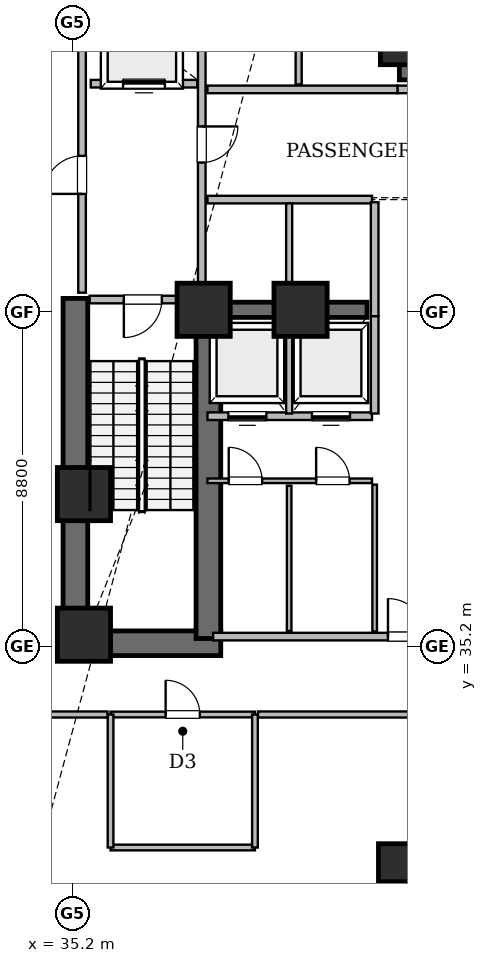
"""IFC4 building model, lengths in metres.
Left out: names, types, materials, properties, quantities, classifications, styles, units other than length and angle.
Written with IfcOpenShell. Run it as: python <this file> out.ifc"""

import sys

from ifc_helpers import new_model, si_unit, direction, frame, frame_2d, origin, origin_2d, place, context, subcontext, project, spatial, rectangle, extrude, element, fill, save


model = new_model("IFC4")
c1 = context("Model", 3, precision=1e-05, world=origin(), true_north=direction((0.0, 1.0)))
c2 = subcontext(c1, "Body", "Model", "MODEL_VIEW")
j1 = project(units=[si_unit("LENGTHUNIT", "METRE"), si_unit("PLANEANGLEUNIT", "RADIAN")], contexts=[c1])
p1 = place(None, origin())
s1 = spatial("IfcSite", under=j1, at=p1, CompositionType="ELEMENT")
p2 = place(p1, origin())
s2 = spatial("IfcBuilding", under=s1, at=p2, CompositionType="ELEMENT")
p3 = place(p2, frame((0.0, 0.0, 24.0)))
s3 = spatial("IfcBuildingStorey", under=s2, at=p3, CompositionType="ELEMENT", Elevation=24.0)
p4 = place(p3, frame((34.95, 35.275, 0.0), z_axis=(0.0, 0.0, 1.0), x_axis=(1.0, 0.0, 0.0)))
e1 = element("IfcWall", 1, at=p4, inside=s3, PredefinedType="SHEAR", context=c2, shape_type="SweptSolid", body=[
    extrude(rectangle(XDim=4.15, YDim=0.65, at=frame_2d((2.075, 0.0))), origin(), (0.0, 0.0, 1.0), 4.925),
])
p5 = place(p3, frame((35.275, 34.95, 0.0), z_axis=(0.0, 0.0, 1.0), x_axis=(0.0, 1.0, 0.0)))
e2 = element("IfcWall", 2, at=p5, inside=s3, PredefinedType="SHEAR", context=c2, shape_type="SweptSolid", body=[
    extrude(rectangle(XDim=9.4, YDim=0.65, at=frame_2d((4.7, 0.0))), origin(), (0.0, 0.0, 1.0), 4.925),
])
p6 = place(p3, frame((38.775, 35.4, 0.0), z_axis=(0.0, 0.0, 1.0), x_axis=(0.0, 1.0, 0.0)))
e3 = element("IfcWall", 3, at=p6, inside=s3, PredefinedType="SHEAR", context=c2, shape_type="SweptSolid", body=[
    extrude(rectangle(XDim=8.95, YDim=0.65, at=frame_2d((4.475, 0.0))), origin(), (0.0, 0.0, 1.0), 4.925),
])
p7 = place(p3, frame((44.0, 50.1, 0.0), z_axis=(0.0, 0.0, 1.0), x_axis=(0.0, 1.0, 0.0)))
e4 = element("IfcWall", 4, at=p7, inside=s3, PredefinedType="SHEAR", context=c2, shape_type="SweptSolid", body=[
    extrude(rectangle(XDim=2.1, YDim=0.4, at=frame_2d((1.05, 0.0))), origin(), (0.0, 0.0, 1.0), 4.925),
])
p8 = place(p3, frame((38.75, 44.05, 0.0), z_axis=(0.0, 0.0, 1.0), x_axis=(1.0, 0.0, 0.0)))
e5 = element("IfcWall", 5, at=p8, inside=s3, PredefinedType="SHEAR", context=c2, shape_type="SweptSolid", body=[
    extrude(rectangle(XDim=4.2, YDim=0.4, at=frame_2d((2.1, 0.0))), origin(), (0.0, 0.0, 1.0), 4.925),
])
for number, where, z_axis, x_axis in (
    (6, (35.5, 35.5, 0.0), (0.0, 0.0, 1.0), (1.0, 0.0, 0.0)),
    (7, (38.65, 44.05, 0.0), (0.0, 0.0, 1.0), (1.0, 0.0, 0.0)),
    (8, (44.0, 51.2, 0.0), (0.0, 0.0, 1.0), (1.0, 0.0, 0.0)),
    (9, (35.5, 39.2, 0.0), (0.0, 0.0, 1.0), (1.0, 0.0, 0.0)),
    (10, (41.2, 44.05, 0.0), (0.0, 0.0, 1.0), (1.0, 0.0, 0.0)),
):
    element("IfcColumn", number, at=place(p3, frame(where, z_axis=z_axis, x_axis=x_axis)), inside=s3, PredefinedType="COLUMN", context=c2, shape_type="SweptSolid", body=[
        extrude(rectangle(XDim=1.4, YDim=1.4, at=origin_2d()), origin(), (0.0, 0.0, 1.0), 5.2),
    ])
p9 = place(p3, frame((44.0, 29.5, 0.0), z_axis=(0.0, 0.0, 1.0), x_axis=(1.0, 0.0, 0.0)))
e11 = element("IfcColumn", 11, at=p9, inside=s3, PredefinedType="COLUMN", context=c2, shape_type="SweptSolid", body=[
    extrude(rectangle(XDim=1.5, YDim=1.0, at=origin_2d()), origin(), (0.0, 0.0, 1.0), 5.2),
])
p10 = place(p3, frame((38.9, 35.45, 0.0), z_axis=(0.0, 0.0, 1.0), x_axis=(1.0, 0.0, 0.0)))
e12 = element("IfcWall", 12, at=p10, inside=s3, PredefinedType="SOLIDWALL", context=c2, shape_type="SweptSolid", body=[
    extrude(rectangle(XDim=10.2, YDim=0.2, at=frame_2d((5.1, 0.0))), origin(), (0.0, 0.0, 1.0), 4.925),
])
p11 = place(p10, frame((4.6, 0.0, 0.0)))
e13 = element("IfcOpeningElement", 13, at=p11, cuts=e12, PredefinedType="OPENING", context=c2, shape_type="SweptSolid", body=[
    extrude(rectangle(XDim=1.0, YDim=2.15, at=frame_2d((0.5, 1.075))), frame((0.0, 0.11, 0.0), z_axis=(0.0, -1.0, 0.0), x_axis=(1.0, 0.0, 0.0)), (0.0, 0.0, 1.0), 0.22),
])
p12 = place(p3, frame((35.45, 44.5, 0.0), z_axis=(0.0, 0.0, 1.0), x_axis=(0.0, 1.0, 0.0)))
e14 = element("IfcWall", 14, at=p12, inside=s3, PredefinedType="SOLIDWALL", context=c2, shape_type="SweptSolid", body=[
    extrude(rectangle(XDim=7.92, YDim=0.2, at=frame_2d((3.96, 0.0))), origin(), (0.0, 0.0, 1.0), 4.925),
])
p13 = place(p12, frame((2.6, 0.0, 0.0)))
e15 = element("IfcOpeningElement", 15, at=p13, cuts=e14, PredefinedType="OPENING", context=c2, shape_type="SweptSolid", body=[
    extrude(rectangle(XDim=1.0, YDim=2.15, at=frame_2d((0.5, 1.075))), frame((0.0, 0.11, 0.0), z_axis=(0.0, -1.0, 0.0), x_axis=(1.0, 0.0, 0.0)), (0.0, 0.0, 1.0), 0.22),
])
p14 = place(p3, frame((38.6, 44.5, 0.0), z_axis=(0.0, 0.0, 1.0), x_axis=(0.0, 1.0, 0.0)))
e16 = element("IfcWall", 16, at=p14, inside=s3, PredefinedType="SOLIDWALL", context=c2, shape_type="SweptSolid", body=[
    extrude(rectangle(XDim=7.92, YDim=0.2, at=frame_2d((3.96, 0.0))), origin(), (0.0, 0.0, 1.0), 4.925),
])
p15 = place(p14, frame((3.425, 0.0, 0.0)))
e17 = element("IfcOpeningElement", 17, at=p15, cuts=e16, PredefinedType="OPENING", context=c2, shape_type="SweptSolid", body=[
    extrude(rectangle(XDim=0.95, YDim=2.15, at=frame_2d((0.475, 1.075))), frame((0.0, 0.11, 0.0), z_axis=(0.0, -1.0, 0.0), x_axis=(1.0, 0.0, 0.0)), (0.0, 0.0, 1.0), 0.22),
])
p16 = place(p3, frame((43.75, 49.85, 0.0), z_axis=(0.0, 0.0, 1.0), x_axis=(1.0, 0.0, 0.0)))
e18 = element("IfcWall", 18, at=p16, inside=s3, PredefinedType="SOLIDWALL", context=c2, shape_type="SweptSolid", body=[
    extrude(rectangle(XDim=5.5, YDim=0.2, at=frame_2d((2.75, 0.0))), origin(), (0.0, 0.0, 1.0), 4.013),
])
p17 = place(p16, frame((3.5, 0.0, 0.0)))
e19 = element("IfcOpeningElement", 19, at=p17, cuts=e18, PredefinedType="OPENING", context=c2, shape_type="SweptSolid", body=[
    extrude(rectangle(XDim=1.1, YDim=2.15, at=frame_2d((0.55, 1.075))), frame((0.0, 0.11, 0.0), z_axis=(0.0, -1.0, 0.0), x_axis=(1.0, 0.0, 0.0)), (0.0, 0.0, 1.0), 0.22),
])
p18 = place(p3, frame((38.75, 41.25, 0.0), z_axis=(0.0, 0.0, 1.0), x_axis=(1.0, 0.0, 0.0)))
e20 = element("IfcWall", 20, at=p18, inside=s3, PredefinedType="SOLIDWALL", context=c2, shape_type="SweptSolid", body=[
    extrude(rectangle(XDim=4.33, YDim=0.2, at=frame_2d((2.165, 0.0))), origin(), (0.0, 0.0, 1.0), 4.925),
])
p19 = place(p18, frame((0.55, 0.0, 0.0)))
e21 = element("IfcOpeningElement", 21, at=p19, cuts=e20, PredefinedType="OPENING", context=c2, shape_type="SweptSolid", body=[
    extrude(rectangle(XDim=1.0, YDim=2.15, at=frame_2d((0.5, 1.075))), frame((0.0, 0.11, 0.0), z_axis=(0.0, -1.0, 0.0), x_axis=(1.0, 0.0, 0.0)), (0.0, 0.0, 1.0), 0.22),
])
p20 = place(p18, frame((2.75, 0.0, 0.0)))
e22 = element("IfcOpeningElement", 22, at=p20, cuts=e20, PredefinedType="OPENING", context=c2, shape_type="SweptSolid", body=[
    extrude(rectangle(XDim=1.0, YDim=2.15, at=frame_2d((0.5, 1.075))), frame((0.0, 0.11, 0.0), z_axis=(0.0, -1.0, 0.0), x_axis=(1.0, 0.0, 0.0)), (0.0, 0.0, 1.0), 0.22),
])
p21 = place(p3, frame((38.75, 39.55, 0.0), z_axis=(0.0, 0.0, 1.0), x_axis=(1.0, 0.0, 0.0)))
e23 = element("IfcWall", 23, at=p21, inside=s3, PredefinedType="PARTITIONING", context=c2, shape_type="SweptSolid", body=[
    extrude(rectangle(XDim=4.33, YDim=0.12, at=frame_2d((2.165, 0.0))), origin(), (0.0, 0.0, 1.0), 4.925),
])
p22 = place(p21, frame((0.56, 0.0, 0.0)))
e24 = element("IfcOpeningElement", 24, at=p22, cuts=e23, PredefinedType="OPENING", context=c2, shape_type="SweptSolid", body=[
    extrude(rectangle(XDim=0.88, YDim=2.1, at=frame_2d((0.44, 1.05))), frame((0.0, 0.07, 0.0), z_axis=(0.0, -1.0, 0.0), x_axis=(1.0, 0.0, 0.0)), (0.0, 0.0, 1.0), 0.14),
])
p23 = place(p21, frame((2.86, 0.0, 0.0)))
e25 = element("IfcOpeningElement", 25, at=p23, cuts=e23, PredefinedType="OPENING", context=c2, shape_type="SweptSolid", body=[
    extrude(rectangle(XDim=0.88, YDim=2.1, at=frame_2d((0.44, 1.05))), frame((0.0, 0.07, 0.0), z_axis=(0.0, -1.0, 0.0), x_axis=(1.0, 0.0, 0.0)), (0.0, 0.0, 1.0), 0.14),
])
p24 = place(p3, frame((36.2, 33.4, 0.0), z_axis=(0.0, 0.0, 1.0), x_axis=(1.0, 0.0, 0.0)))
e26 = element("IfcWall", 26, at=p24, inside=s3, PredefinedType="PLUMBINGWALL", context=c2, shape_type="SweptSolid", body=[
    extrude(rectangle(XDim=3.8, YDim=0.15, at=frame_2d((1.9, 0.0))), origin(), (0.0, 0.0, 1.0), 4.263),
])
p25 = place(p24, frame((1.45, 0.0, 0.0)))
e27 = element("IfcOpeningElement", 27, at=p25, cuts=e26, PredefinedType="OPENING", context=c2, shape_type="SweptSolid", body=[
    extrude(rectangle(XDim=0.9, YDim=2.1, at=frame_2d((0.45, 1.05))), frame((0.0, 0.085, 0.0), z_axis=(0.0, -1.0, 0.0), x_axis=(1.0, 0.0, 0.0)), (0.0, 0.0, 1.0), 0.17),
])
p26 = place(p3, frame((35.65, 44.32, 0.0), z_axis=(0.0, 0.0, 1.0), x_axis=(1.0, 0.0, 0.0)))
e28 = element("IfcWall", 28, at=p26, inside=s3, PredefinedType="SOLIDWALL", context=c2, shape_type="SweptSolid", body=[
    extrude(rectangle(XDim=2.8, YDim=0.2, at=frame_2d((1.4, 0.0))), origin(), (0.0, 0.0, 1.0), 4.925),
])
p27 = place(p26, frame((0.9, 0.0, 0.0)))
e29 = element("IfcOpeningElement", 29, at=p27, cuts=e28, PredefinedType="OPENING", context=c2, shape_type="SweptSolid", body=[
    extrude(rectangle(XDim=1.0, YDim=2.15, at=frame_2d((0.5, 1.075))), frame((0.0, 0.11, 0.0), z_axis=(0.0, -1.0, 0.0), x_axis=(1.0, 0.0, 0.0)), (0.0, 0.0, 1.0), 0.22),
])
p28 = place(p3, frame((35.68, 50.0, 0.0), z_axis=(0.0, 0.0, 1.0), x_axis=(1.0, 0.0, 0.0)))
e30 = element("IfcWall", 30, at=p28, inside=s3, PredefinedType="SOLIDWALL", context=c2, shape_type="SweptSolid", body=[
    extrude(rectangle(XDim=2.8, YDim=0.2, at=frame_2d((1.4, 0.0))), origin(), (0.0, 0.0, 1.0), 4.925),
])
p29 = place(p28, frame((0.85, 0.0, 0.0)))
e31 = element("IfcOpeningElement", 31, at=p29, cuts=e30, PredefinedType="OPENING", context=c2, shape_type="SweptSolid", body=[
    extrude(rectangle(XDim=1.1, YDim=2.15, at=frame_2d((0.55, 1.075))), frame((0.0, 0.11, 0.0), z_axis=(0.0, -1.0, 0.0), x_axis=(1.0, 0.0, 0.0)), (0.0, 0.0, 1.0), 0.22),
])
p30 = place(p3, frame((38.75, 49.85, 0.0), z_axis=(0.0, 0.0, 1.0), x_axis=(1.0, 0.0, 0.0)))
e32 = element("IfcWall", 32, at=p30, inside=s3, PredefinedType="SOLIDWALL", context=c2, shape_type="SweptSolid", body=[
    extrude(rectangle(XDim=5.0, YDim=0.2, at=frame_2d((2.5, 0.0))), origin(), (0.0, 0.0, 1.0), 4.925),
])
p31 = place(p3, frame((40.08, 33.4, 0.0), z_axis=(0.0, 0.0, 1.0), x_axis=(1.0, 0.0, 0.0)))
e33 = element("IfcWall", 33, at=p31, inside=s3, PredefinedType="SOLIDWALL", context=c2, shape_type="SweptSolid", body=[
    extrude(rectangle(XDim=4.34, YDim=0.16, at=frame_2d((2.17, 0.0))), origin(), (0.0, 0.0, 1.0), 4.925),
])
p32 = place(p3, frame((38.75, 46.95, 0.0), z_axis=(0.0, 0.0, 1.0), x_axis=(1.0, 0.0, 0.0)))
e34 = element("IfcWall", 34, at=p32, inside=s3, PredefinedType="SOLIDWALL", context=c2, shape_type="SweptSolid", body=[
    extrude(rectangle(XDim=4.33, YDim=0.2, at=frame_2d((2.165, 0.0))), origin(), (0.0, 0.0, 1.0), 4.925),
])
p33 = place(p3, frame((43.15, 35.58, 0.0), z_axis=(0.0, 0.0, 1.0), x_axis=(0.0, 1.0, 0.0)))
e35 = element("IfcWall", 35, at=p33, inside=s3, PredefinedType="PARTITIONING", context=c2, shape_type="SweptSolid", body=[
    extrude(rectangle(XDim=3.87, YDim=0.12, at=frame_2d((1.935, 0.0))), origin(), (0.0, 0.0, 1.0), 4.925),
])
p34 = place(p3, frame((40.9, 35.6, 0.0), z_axis=(0.0, 0.0, 1.0), x_axis=(0.0, 1.0, 0.0)))
e36 = element("IfcWall", 36, at=p34, inside=s3, PredefinedType="PARTITIONING", context=c2, shape_type="SweptSolid", body=[
    extrude(rectangle(XDim=3.82, YDim=0.12, at=frame_2d((1.91, 0.0))), origin(), (0.0, 0.0, 1.0), 4.925),
])
p35 = place(p3, frame((36.2, 29.9, 0.0), z_axis=(0.0, 0.0, 1.0), x_axis=(1.0, 0.0, 0.0)))
e37 = element("IfcWall", 37, at=p35, inside=s3, PredefinedType="PLUMBINGWALL", context=c2, shape_type="SweptSolid", body=[
    extrude(rectangle(XDim=3.8, YDim=0.15, at=frame_2d((1.9, 0.0))), origin(), (0.0, 0.0, 1.0), 4.925),
])
for number, where, z_axis, x_axis in (
    (38, (36.2, 33.4, 0.0), (0.0, 0.0, 1.0), (0.0, -1.0, 0.0)),
    (39, (40.0, 29.9, 0.0), (0.0, 0.0, 1.0), (0.0, 1.0, 0.0)),
):
    element("IfcWall", number, at=place(p3, frame(where, z_axis=z_axis, x_axis=x_axis)), inside=s3, PredefinedType="PLUMBINGWALL", context=c2, shape_type="SweptSolid", body=[
        extrude(rectangle(XDim=3.5, YDim=0.15, at=frame_2d((1.75, 0.0))), origin(), (0.0, 0.0, 1.0), 4.263),
    ])
p36 = place(p3, frame((43.15, 43.88, 0.0), z_axis=(0.0, 0.0, 1.0), x_axis=(0.0, 1.0, 0.0)))
e40 = element("IfcWall", 40, at=p36, inside=s3, PredefinedType="SOLIDWALL", context=c2, shape_type="SweptSolid", body=[
    extrude(rectangle(XDim=3.0, YDim=0.2, at=frame_2d((1.5, 0.0))), origin(), (0.0, 0.0, 1.0), 4.925),
])
p37 = place(p3, frame((33.48, 33.4, 0.0), z_axis=(0.0, 0.0, 1.0), x_axis=(1.0, 0.0, 0.0)))
e41 = element("IfcWall", 41, at=p37, inside=s3, PredefinedType="SOLIDWALL", context=c2, shape_type="SweptSolid", body=[
    extrude(rectangle(XDim=2.64, YDim=0.16, at=frame_2d((1.32, 0.0))), origin(), (0.0, 0.0, 1.0), 4.263),
])
p38 = place(p3, frame((43.15, 41.32, 0.0), z_axis=(0.0, 0.0, 1.0), x_axis=(0.0, 1.0, 0.0)))
e42 = element("IfcWall", 42, at=p38, inside=s3, PredefinedType="SOLIDWALL", context=c2, shape_type="SweptSolid", body=[
    extrude(rectangle(XDim=2.56, YDim=0.2, at=frame_2d((1.28, 0.0))), origin(), (0.0, 0.0, 1.0), 4.925),
])
p39 = place(p3, frame((40.9, 44.3, 0.0), z_axis=(0.0, 0.0, 1.0), x_axis=(0.0, 1.0, 0.0)))
e43 = element("IfcWall", 43, at=p39, inside=s3, PredefinedType="SOLIDWALL", context=c2, shape_type="SweptSolid", body=[
    extrude(rectangle(XDim=2.55, YDim=0.16, at=frame_2d((1.275, 0.0))), origin(), (0.0, 0.0, 1.0), 4.925),
])
p40 = place(p3, frame((40.9, 41.32, 0.0), z_axis=(0.0, 0.0, 1.0), x_axis=(0.0, 1.0, 0.0)))
e44 = element("IfcWall", 44, at=p40, inside=s3, PredefinedType="SOLIDWALL", context=c2, shape_type="SweptSolid", body=[
    extrude(rectangle(XDim=2.53, YDim=0.16, at=frame_2d((1.265, 0.0))), origin(), (0.0, 0.0, 1.0), 4.925),
])
p41 = place(p3, frame((41.15, 49.98, 0.0), z_axis=(0.0, 0.0, 1.0), x_axis=(0.0, 1.0, 0.0)))
e45 = element("IfcWall", 45, at=p41, inside=s3, PredefinedType="SOLIDWALL", context=c2, shape_type="SweptSolid", body=[
    extrude(rectangle(XDim=2.37, YDim=0.16, at=frame_2d((1.185, 0.0))), origin(), (0.0, 0.0, 1.0), 4.925),
])
p42 = place(p27, frame((1.0, 0.0, 0.0), z_axis=(0.0, 0.0, 1.0), x_axis=(-1.0, 0.0, 0.0)))
e46 = element("IfcDoor", 46, at=p42, inside=s3, OperationType="SINGLE_SWING_LEFT", PredefinedType="DOOR", context=c2, shape_type="SweptSolid", body=[
    extrude(rectangle(XDim=1.0, YDim=2.15, at=frame_2d((0.5, 1.075))), frame((0.0, 0.025, 0.0), z_axis=(0.0, -1.0, 0.0), x_axis=(1.0, 0.0, 0.0)), (0.0, 0.0, 1.0), 0.05),
])
fill(e29, e46)
p43 = place(p13, origin())
e47 = element("IfcDoor", 47, at=p43, inside=s3, OperationType="SINGLE_SWING_LEFT", PredefinedType="DOOR", context=c2, shape_type="SweptSolid", body=[
    extrude(rectangle(XDim=1.0, YDim=2.15, at=frame_2d((0.5, 1.075))), frame((0.0, 0.025, 0.0), z_axis=(0.0, -1.0, 0.0), x_axis=(1.0, 0.0, 0.0)), (0.0, 0.0, 1.0), 0.05),
])
fill(e15, e47)
p44 = place(p15, frame((0.95, 0.0, 0.0), z_axis=(0.0, 0.0, 1.0), x_axis=(-1.0, 0.0, 0.0)))
e48 = element("IfcDoor", 48, at=p44, inside=s3, OperationType="SINGLE_SWING_RIGHT", PredefinedType="DOOR", context=c2, shape_type="SweptSolid", body=[
    extrude(rectangle(XDim=0.95, YDim=2.15, at=frame_2d((0.475, 1.075))), frame((0.0, 0.025, 0.0), z_axis=(0.0, -1.0, 0.0), x_axis=(1.0, 0.0, 0.0)), (0.0, 0.0, 1.0), 0.05),
])
fill(e17, e48)
p45 = place(p29, origin())
e49 = element("IfcDoor", 49, at=p45, inside=s3, OperationType="SLIDING_TO_LEFT", PredefinedType="DOOR", context=c2, shape_type="SweptSolid", body=[
    extrude(rectangle(XDim=1.1, YDim=2.15, at=frame_2d((0.55, 1.075))), frame((0.0, 0.025, 0.0), z_axis=(0.0, -1.0, 0.0), x_axis=(1.0, 0.0, 0.0)), (0.0, 0.0, 1.0), 0.05),
])
fill(e31, e49)
p46 = place(p11, origin())
e50 = element("IfcDoor", 50, at=p46, inside=s3, OperationType="SINGLE_SWING_LEFT", PredefinedType="DOOR", context=c2, shape_type="SweptSolid", body=[
    extrude(rectangle(XDim=1.0, YDim=2.15, at=frame_2d((0.5, 1.075))), frame((0.0, 0.025, 0.0), z_axis=(0.0, -1.0, 0.0), x_axis=(1.0, 0.0, 0.0)), (0.0, 0.0, 1.0), 0.05),
])
fill(e13, e50)
p47 = place(p19, frame((1.0, 0.0, 0.0), z_axis=(0.0, 0.0, 1.0), x_axis=(-1.0, 0.0, 0.0)))
e51 = element("IfcDoor", 51, at=p47, inside=s3, OperationType="SLIDING_TO_LEFT", PredefinedType="DOOR", context=c2, shape_type="SweptSolid", body=[
    extrude(rectangle(XDim=1.0, YDim=2.15, at=frame_2d((0.5, 1.075))), frame((0.0, 0.025, 0.0), z_axis=(0.0, -1.0, 0.0), x_axis=(1.0, 0.0, 0.0)), (0.0, 0.0, 1.0), 0.05),
])
fill(e21, e51)
p48 = place(p20, frame((1.0, 0.0, 0.0), z_axis=(0.0, 0.0, 1.0), x_axis=(-1.0, 0.0, 0.0)))
e52 = element("IfcDoor", 52, at=p48, inside=s3, OperationType="SLIDING_TO_LEFT", PredefinedType="DOOR", context=c2, shape_type="SweptSolid", body=[
    extrude(rectangle(XDim=1.0, YDim=2.15, at=frame_2d((0.5, 1.075))), frame((0.0, 0.025, 0.0), z_axis=(0.0, -1.0, 0.0), x_axis=(1.0, 0.0, 0.0)), (0.0, 0.0, 1.0), 0.05),
])
fill(e22, e52)
p49 = place(p22, origin())
e53 = element("IfcDoor", 53, at=p49, inside=s3, OperationType="SINGLE_SWING_LEFT", PredefinedType="DOOR", context=c2, shape_type="SweptSolid", body=[
    extrude(rectangle(XDim=0.88, YDim=2.1, at=frame_2d((0.44, 1.05))), frame((0.0, 0.025, 0.0), z_axis=(0.0, -1.0, 0.0), x_axis=(1.0, 0.0, 0.0)), (0.0, 0.0, 1.0), 0.05),
])
fill(e24, e53)
p50 = place(p23, origin())
e54 = element("IfcDoor", 54, at=p50, inside=s3, OperationType="SINGLE_SWING_LEFT", PredefinedType="DOOR", context=c2, shape_type="SweptSolid", body=[
    extrude(rectangle(XDim=0.88, YDim=2.1, at=frame_2d((0.44, 1.05))), frame((0.0, 0.025, 0.0), z_axis=(0.0, -1.0, 0.0), x_axis=(1.0, 0.0, 0.0)), (0.0, 0.0, 1.0), 0.05),
])
fill(e25, e54)
p51 = place(p25, origin())
e55 = element("IfcDoor", 55, at=p51, inside=s3, OperationType="SINGLE_SWING_LEFT", PredefinedType="DOOR", context=c2, shape_type="SweptSolid", body=[
    extrude(rectangle(XDim=0.9, YDim=2.1, at=frame_2d((0.45, 1.05))), frame((0.0, 0.025, 0.0), z_axis=(0.0, -1.0, 0.0), x_axis=(1.0, 0.0, 0.0)), (0.0, 0.0, 1.0), 0.05),
])
fill(e27, e55)
save(model, sys.argv[1])
